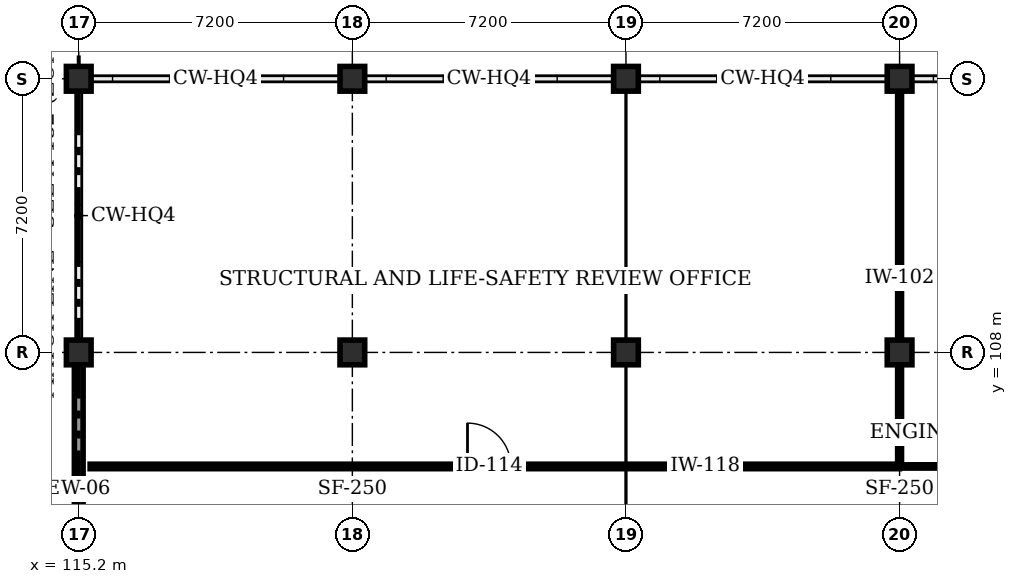
"""IFC4 building model, lengths in metres.
Left out: names, types, materials, properties, quantities, classifications, styles, units other than length and angle.
Written with IfcOpenShell. Run it as: python <this file> out.ifc"""

import sys

from ifc_helpers import new_model, si_unit, direction, frame, frame_2d, origin, origin_2d, place, context, subcontext, project, spatial, rectangle, extrude, element, fill, save


model = new_model("IFC4")
c1 = context("Model", 3, precision=1e-05, world=origin(), true_north=direction((0.0, 1.0)))
c2 = subcontext(c1, "Body", "Model", "MODEL_VIEW")
j1 = project(units=[si_unit("LENGTHUNIT", "METRE"), si_unit("PLANEANGLEUNIT", "RADIAN")], contexts=[c1])
p1 = place(None, origin())
s1 = spatial("IfcSite", under=j1, at=p1, CompositionType="ELEMENT")
p2 = place(p1, origin())
s2 = spatial("IfcBuilding", under=s1, at=p2, CompositionType="ELEMENT")
p3 = place(p2, frame((0.0, 0.0, 14.4)))
s3 = spatial("IfcBuildingStorey", under=s2, at=p3, CompositionType="ELEMENT", Elevation=14.4)
for number, where, z_axis, x_axis in (
    (1, (115.2, 108.0, 0.0), (0.0, 0.0, 1.0), (1.0, 0.0, 0.0)),
    (2, (115.2, 115.2, 0.0), (0.0, 0.0, 1.0), (1.0, 0.0, 0.0)),
    (3, (122.4, 108.0, 0.0), (0.0, 0.0, 1.0), (1.0, 0.0, 0.0)),
    (4, (122.4, 115.2, 0.0), (0.0, 0.0, 1.0), (1.0, 0.0, 0.0)),
    (5, (129.6, 108.0, 0.0), (0.0, 0.0, 1.0), (1.0, 0.0, 0.0)),
    (6, (129.6, 115.2, 0.0), (0.0, 0.0, 1.0), (1.0, 0.0, 0.0)),
    (7, (136.8, 108.0, 0.0), (0.0, 0.0, 1.0), (1.0, 0.0, 0.0)),
    (8, (136.8, 115.2, 0.0), (0.0, 0.0, 1.0), (1.0, 0.0, 0.0)),
):
    element("IfcColumn", number, at=place(p3, frame(where, z_axis=z_axis, x_axis=x_axis)), inside=s3, PredefinedType="COLUMN", context=c2, shape_type="SweptSolid", body=[
        extrude(rectangle(XDim=0.65, YDim=0.65, at=origin_2d()), origin(), (0.0, 0.0, 1.0), 3.6),
    ])
p4 = place(p3, frame((115.2, 108.0, 0.0), z_axis=(0.0, 0.0, 1.0), x_axis=(0.0, -1.0, 0.0)))
e9 = element("IfcWall", 9, at=p4, inside=s3, PredefinedType="STANDARD", context=c2, shape_type="SweptSolid", body=[
    extrude(rectangle(XDim=7.2, YDim=0.23, at=frame_2d((3.6, 0.0))), origin(), (0.0, 0.0, 1.0), 2.75),
])
p5 = place(p3, frame((115.5, 105.0, 0.0), z_axis=(0.0, 0.0, 1.0), x_axis=(1.0, 0.0, 0.0)))
e10 = element("IfcWall", 10, at=p5, inside=s3, PredefinedType="STANDARD", context=c2, shape_type="SweptSolid", body=[
    extrude(rectangle(XDim=21.3, YDim=0.118, at=frame_2d((10.65, 0.0))), origin(), (0.0, 0.0, 1.0), 2.827),
])
p6 = place(p5, frame((9.93, 0.0, 0.0)))
e11 = element("IfcOpeningElement", 11, at=p6, cuts=e10, PredefinedType="OPENING", context=c2, shape_type="SweptSolid", body=[
    extrude(rectangle(XDim=1.14, YDim=2.2, at=frame_2d((0.57, 1.1))), frame((0.0, 0.069, 0.0), z_axis=(0.0, -1.0, 0.0), x_axis=(1.0, 0.0, 0.0)), (0.0, 0.0, 1.0), 0.138),
])
p7 = place(p3, frame((136.8, 105.0, 0.0), z_axis=(0.0, 0.0, 1.0), x_axis=(0.0, 1.0, 0.0)))
e12 = element("IfcWall", 12, at=p7, inside=s3, PredefinedType="STANDARD", context=c2, shape_type="SweptSolid", body=[
    extrude(rectangle(XDim=9.9, YDim=0.102, at=frame_2d((4.95, 0.0))), origin(), (0.0, 0.0, 1.0), 2.827),
])
p8 = place(p3, frame((136.8, 105.0, 0.0), z_axis=(0.0, 0.0, 1.0), x_axis=(1.0, 0.0, 0.0)))
e13 = element("IfcWall", 13, at=p8, inside=s3, PredefinedType="STANDARD", context=c2, shape_type="SweptSolid", body=[
    extrude(rectangle(XDim=21.3, YDim=0.086, at=frame_2d((10.65, 0.0))), origin(), (0.0, 0.0, 1.0), 2.827),
])
p9 = place(p8, frame((10.24, 0.0, 0.0)))
e14 = element("IfcOpeningElement", 14, at=p9, cuts=e13, PredefinedType="OPENING", context=c2, shape_type="SweptSolid", body=[
    extrude(rectangle(XDim=1.12, YDim=2.2, at=frame_2d((0.56, 1.1))), frame((0.0, 0.053, 0.0), z_axis=(0.0, -1.0, 0.0), x_axis=(1.0, 0.0, 0.0)), (0.0, 0.0, 1.0), 0.106),
])
p10 = place(p6, origin())
e15 = element("IfcDoor", 15, at=p10, inside=s3, OperationType="SINGLE_SWING_LEFT", PredefinedType="DOOR", context=c2, shape_type="SweptSolid", body=[
    extrude(rectangle(XDim=1.14, YDim=2.2, at=frame_2d((0.57, 1.1))), frame((0.0, 0.025, 0.0), z_axis=(0.0, -1.0, 0.0), x_axis=(1.0, 0.0, 0.0)), (0.0, 0.0, 1.0), 0.05),
])
fill(e11, e15)
save(model, sys.argv[1])
